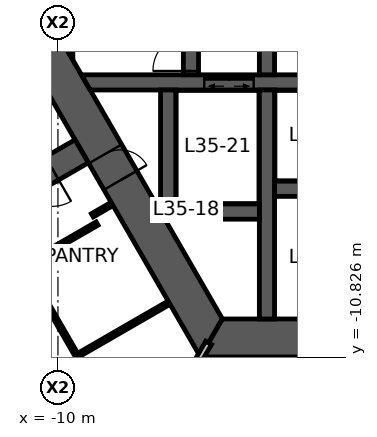
"""IFC4 building model, lengths in metres.
Left out: names, types, materials, properties, quantities, classifications, styles, units other than length and angle.
Written with IfcOpenShell. Run it as: python <this file> out.ifc"""

import sys

from ifc_helpers import new_model, si_unit, direction, frame, frame_2d, origin, place, context, subcontext, project, spatial, polyline, rectangle, outline, extrude, element, fill, save


model = new_model("IFC4")
c1 = context("Model", 3, precision=1e-05, world=origin(), true_north=direction((0.0, 1.0)))
c2 = subcontext(c1, "Body", "Model", "MODEL_VIEW")
j1 = project(units=[si_unit("LENGTHUNIT", "METRE"), si_unit("PLANEANGLEUNIT", "RADIAN")], contexts=[c1])
p1 = place(None, origin())
s1 = spatial("IfcSite", under=j1, at=p1, CompositionType="ELEMENT")
p2 = place(p1, origin())
s2 = spatial("IfcBuilding", under=s1, at=p2, CompositionType="ELEMENT")
p3 = place(p2, frame((0.0, 0.0, 140.9)))
s3 = spatial("IfcBuildingStorey", under=s2, at=p3, CompositionType="ELEMENT", Elevation=140.9)
p4 = place(p3, frame((-11.922, 0.0, 0.0), z_axis=(0.0, 0.0, 1.0), x_axis=(0.500004296715, -0.866022923061, 0.0)))
e1 = element("IfcWall", 1, at=p4, inside=s3, PredefinedType="SHEAR", context=c2, shape_type="SweptSolid", body=[
    extrude(outline(polyline([(-0.289, -0.5), (6.331, -0.5), (7.131, -0.5), (12.211, -0.5), (11.634, 0.5), (7.131, 0.5), (6.331, 0.5), (0.289, 0.5), (-0.289, -0.5)])), origin(), (0.0, 0.0, 1.0), 3.9),
])
p5 = place(p4, frame((6.331, 0.0, 0.0)))
e2 = element("IfcOpeningElement", 2, at=p5, cuts=e1, PredefinedType="OPENING", context=c2, shape_type="SweptSolid", body=[
    extrude(rectangle(XDim=0.8, YDim=2.1, at=frame_2d((0.4, 1.05))), frame((0.0, 0.51, 0.0), z_axis=(0.0, -1.0, 0.0), x_axis=(1.0, 0.0, 0.0)), (0.0, 0.0, 1.0), 1.02),
])
p6 = place(p3, frame((-5.961, -10.325, 0.0), z_axis=(0.0, 0.0, 1.0), x_axis=(1.0, 0.0, 0.0)))
e3 = element("IfcWall", 3, at=p6, inside=s3, PredefinedType="SHEAR", context=c2, shape_type="SweptSolid", body=[
    extrude(outline(polyline([(-0.289, -0.5), (5.461, -0.5), (6.461, -0.5), (12.211, -0.5), (11.634, 0.5), (6.461, 0.5), (5.461, 0.5), (0.289, 0.5), (-0.289, -0.5)])), origin(), (0.0, 0.0, 1.0), 3.9),
])
p7 = place(p6, frame((5.461, 0.0, 0.0)))
e4 = element("IfcOpeningElement", 4, at=p7, cuts=e3, PredefinedType="OPENING", context=c2, shape_type="SweptSolid", body=[
    extrude(rectangle(XDim=1.0, YDim=2.1, at=frame_2d((0.5, 1.05))), frame((0.0, 0.51, 0.0), z_axis=(0.0, -1.0, 0.0), x_axis=(1.0, 0.0, 0.0)), (0.0, 0.0, 1.0), 1.02),
])
p8 = place(p3, frame((-9.375, -5.413, 0.0), z_axis=(0.0, 0.0, 1.0), x_axis=(-0.866032377459, -0.499987921047, 0.0)))
e5 = element("IfcWall", 5, at=p8, inside=s3, PredefinedType="SHEAR", context=c2, shape_type="SweptSolid", body=[
    extrude(rectangle(XDim=7.696, YDim=0.7, at=frame_2d((3.848, 0.0))), origin(), (0.0, 0.0, 1.0), 3.9),
])
p9 = place(p8, frame((0.9, 0.0, 0.0)))
e6 = element("IfcOpeningElement", 6, at=p9, cuts=e5, PredefinedType="OPENING", context=c2, shape_type="SweptSolid", body=[
    extrude(rectangle(XDim=1.0, YDim=2.1, at=frame_2d((0.5, 1.05))), frame((0.0, 0.36, 0.0), z_axis=(0.0, -1.0, 0.0), x_axis=(1.0, 0.0, 0.0)), (0.0, 0.0, 1.0), 0.72),
])
p10 = place(p3, frame((-9.266, -3.6, 0.0), z_axis=(0.0, 0.0, 1.0), x_axis=(1.0, 0.0, 0.0)))
e7 = element("IfcWall", 7, at=p10, inside=s3, PredefinedType="SHEAR", context=c2, shape_type="SweptSolid", body=[
    extrude(outline(polyline([(0.115, -0.2), (3.116, -0.2), (4.417, -0.2), (5.667, -0.2), (6.767, -0.2), (7.866, -0.2), (7.866, 0.2), (6.767, 0.2), (5.667, 0.2), (4.417, 0.2), (3.116, 0.2), (-0.115, 0.2), (0.115, -0.2)])), origin(), (0.0, 0.0, 1.0), 3.9),
])
p11 = place(p10, frame((5.667, 0.0, 0.0)))
e8 = element("IfcOpeningElement", 8, at=p11, cuts=e7, PredefinedType="OPENING", context=c2, shape_type="SweptSolid", body=[
    extrude(rectangle(XDim=1.1, YDim=2.1, at=frame_2d((0.55, 1.05))), frame((0.0, 0.21, 0.0), z_axis=(0.0, -1.0, 0.0), x_axis=(1.0, 0.0, 0.0)), (0.0, 0.0, 1.0), 0.42),
])
p12 = place(p10, frame((3.116, 0.0, 0.0)))
e9 = element("IfcOpeningElement", 9, at=p12, cuts=e7, PredefinedType="OPENING", context=c2, shape_type="SweptSolid", body=[
    extrude(rectangle(XDim=1.3, YDim=2.1, at=frame_2d((0.65, 1.05))), frame((0.0, 0.21, 0.0), z_axis=(0.0, -1.0, 0.0), x_axis=(1.0, 0.0, 0.0)), (0.0, 0.0, 1.0), 0.42),
])
p13 = place(p3, frame((-4.5, -3.4, 0.0), z_axis=(0.0, 0.0, 1.0), x_axis=(0.0, 1.0, 0.0)))
e10 = element("IfcWall", 10, at=p13, inside=s3, PredefinedType="SHEAR", context=c2, shape_type="SweptSolid", body=[
    extrude(rectangle(XDim=6.8, YDim=0.4, at=frame_2d((3.4, 0.0))), origin(), (0.0, 0.0, 1.0), 3.9),
])
p14 = place(p13, frame((2.9, 0.0, 0.0)))
e11 = element("IfcOpeningElement", 11, at=p14, cuts=e10, PredefinedType="OPENING", context=c2, shape_type="SweptSolid", body=[
    extrude(rectangle(XDim=1.0, YDim=2.1, at=frame_2d((0.5, 1.05))), frame((0.0, 0.21, 0.0), z_axis=(0.0, -1.0, 0.0), x_axis=(1.0, 0.0, 0.0)), (0.0, 0.0, 1.0), 0.42),
])
p15 = place(p3, frame((-6.5, -3.4, 0.0), z_axis=(0.0, 0.0, 1.0), x_axis=(0.0, 1.0, 0.0)))
e12 = element("IfcWall", 12, at=p15, inside=s3, PredefinedType="SHEAR", context=c2, shape_type="SweptSolid", body=[
    extrude(rectangle(XDim=6.8, YDim=0.4, at=frame_2d((3.4, 0.0))), origin(), (0.0, 0.0, 1.0), 3.9),
])
p16 = place(p15, frame((0.1, 0.0, 0.0)))
e13 = element("IfcOpeningElement", 13, at=p16, cuts=e12, PredefinedType="OPENING", context=c2, shape_type="SweptSolid", body=[
    extrude(rectangle(XDim=1.0, YDim=2.1, at=frame_2d((0.5, 1.05))), frame((0.0, 0.21, 0.0), z_axis=(0.0, -1.0, 0.0), x_axis=(1.0, 0.0, 0.0)), (0.0, 0.0, 1.0), 0.42),
])
p17 = place(p3, frame((-4.5, -3.8, 0.0), z_axis=(0.0, 0.0, 1.0), x_axis=(0.0, -1.0, 0.0)))
e14 = element("IfcWall", 14, at=p17, inside=s3, PredefinedType="SHEAR", context=c2, shape_type="SweptSolid", body=[
    extrude(rectangle(XDim=6.025, YDim=0.4, at=frame_2d((3.012, 0.0))), origin(), (0.0, 0.0, 1.0), 3.9),
])
p18 = place(p3, frame((-4.3, -6.4, 0.0), z_axis=(0.0, 0.0, 1.0), x_axis=(1.0, 0.0, 0.0)))
e15 = element("IfcWall", 15, at=p18, inside=s3, PredefinedType="SHEAR", context=c2, shape_type="SweptSolid", body=[
    extrude(rectangle(XDim=2.5, YDim=0.4, at=frame_2d((1.25, 0.0))), origin(), (0.0, 0.0, 1.0), 3.9),
])
p19 = place(p3, frame((-6.9, -7.0, 0.0), z_axis=(0.0, 0.0, 1.0), x_axis=(1.0, 0.0, 0.0)))
e16 = element("IfcWall", 16, at=p19, inside=s3, PredefinedType="SHEAR", context=c2, shape_type="SweptSolid", body=[
    extrude(rectangle(XDim=2.2, YDim=0.4, at=frame_2d((1.1, 0.0))), origin(), (0.0, 0.0, 1.0), 3.9),
])
p20 = place(p3, frame((-7.1, -3.8, 0.0), z_axis=(0.0, 0.0, 1.0), x_axis=(0.0, -1.0, 0.0)))
e17 = element("IfcWall", 17, at=p20, inside=s3, PredefinedType="SHEAR", context=c2, shape_type="SweptSolid", body=[
    extrude(outline(polyline([(0.0, -0.2), (3.206, -0.2), (3.4, 0.0), (3.4, 0.2), (0.0, 0.2), (0.0, -0.2)])), origin(), (0.0, 0.0, 1.0), 3.9),
])
p21 = place(p3, frame((-9.808, -2.662, 0.0), z_axis=(0.0, 0.0, 1.0), x_axis=(0.0, 1.0, 0.0)))
e18 = element("IfcWall", 18, at=p21, inside=s3, PredefinedType="SHEAR", context=c2, shape_type="SweptSolid", body=[
    extrude(outline(polyline([(-0.346, -0.2), (5.671, -0.2), (4.978, 0.2), (0.346, 0.2), (-0.346, -0.2)])), origin(), (0.0, 0.0, 1.0), 3.9),
])
p22 = place(p3, frame((-6.035, -10.453, 0.0), z_axis=(0.0, 0.0, 1.0), x_axis=(-0.499989830942, -0.866031274813, 0.0)))
e19 = element("IfcWall", 19, at=p22, inside=s3, PredefinedType="PARTITIONING", context=c2, shape_type="SweptSolid", body=[
    extrude(rectangle(XDim=7.93, YDim=0.175, at=frame_2d((3.965, 0.0))), origin(), (0.0, 0.0, 1.0), 3.05),
])
p23 = place(p22, frame((1.13, 0.0, 0.0)))
e20 = element("IfcOpeningElement", 20, at=p23, cuts=e19, PredefinedType="OPENING", context=c2, shape_type="SweptSolid", body=[
    extrude(rectangle(XDim=1.0, YDim=2.1, at=frame_2d((0.5, 1.05))), frame((0.0, 0.098, 0.0), z_axis=(0.0, -1.0, 0.0), x_axis=(1.0, 0.0, 0.0)), (0.0, 0.0, 1.0), 0.195),
])
p24 = place(p3, frame((-10.355, -8.115, 0.0), z_axis=(0.0, 0.0, 1.0), x_axis=(0.866094119867, 0.499880961361, 0.0)))
e21 = element("IfcWall", 21, at=p24, inside=s3, PredefinedType="PARTITIONING", context=c2, shape_type="SweptSolid", body=[
    extrude(rectangle(XDim=1.6, YDim=0.1, at=frame_2d((0.8, 0.0))), origin(), (0.0, 0.0, 1.0), 2.95),
])
p25 = place(p3, frame((-9.5, -10.796, 0.0), z_axis=(0.0, 0.0, 1.0), x_axis=(-0.499990139034, 0.866031096941, 0.0)))
e22 = element("IfcWall", 22, at=p25, inside=s3, PredefinedType="PARTITIONING", context=c2, shape_type="SweptSolid", body=[
    extrude(rectangle(XDim=3.0, YDim=0.1, at=frame_2d((1.5, 0.0))), origin(), (0.0, 0.0, 1.0), 2.95),
])
p26 = place(p25, frame((1.8, 0.0, 0.0)))
e23 = element("IfcOpeningElement", 23, at=p26, cuts=e22, PredefinedType="OPENING", context=c2, shape_type="SweptSolid", body=[
    extrude(rectangle(XDim=0.9, YDim=2.1, at=frame_2d((0.45, 1.05))), frame((0.0, 0.06, 0.0), z_axis=(0.0, -1.0, 0.0), x_axis=(1.0, 0.0, 0.0)), (0.0, 0.0, 1.0), 0.12),
])
p27 = place(p3, frame((-9.094, -7.098, 0.0), z_axis=(0.0, 0.0, 1.0), x_axis=(0.865954211699, 0.50012328804, 0.0)))
e24 = element("IfcWall", 24, at=p27, inside=s3, PredefinedType="PARTITIONING", context=c2, shape_type="SweptSolid", body=[
    extrude(rectangle(XDim=0.58, YDim=0.1, at=frame_2d((0.29, 0.0))), origin(), (0.0, 0.0, 1.0), 2.95),
])
p28 = place(p3, frame((-7.092, -9.406, 0.0), z_axis=(0.0, 0.0, 1.0), x_axis=(-0.86603494908, -0.499983466698, 0.0)))
e25 = element("IfcWall", 25, at=p28, inside=s3, PredefinedType="PARTITIONING", context=c2, shape_type="SweptSolid", body=[
    extrude(rectangle(XDim=2.78, YDim=0.1, at=frame_2d((1.39, 0.0))), origin(), (0.0, 0.0, 1.0), 2.95),
])
p29 = place(p5, origin())
e26 = element("IfcDoor", 26, at=p29, inside=s3, OperationType="SINGLE_SWING_RIGHT", PredefinedType="DOOR", context=c2, shape_type="SweptSolid", body=[
    extrude(rectangle(XDim=0.8, YDim=2.1, at=frame_2d((0.4, 1.05))), frame((0.0, 0.025, 0.0), z_axis=(0.0, -1.0, 0.0), x_axis=(1.0, 0.0, 0.0)), (0.0, 0.0, 1.0), 0.05),
])
fill(e2, e26)
p30 = place(p16, origin())
e27 = element("IfcDoor", 27, at=p30, inside=s3, OperationType="SINGLE_SWING_LEFT", PredefinedType="DOOR", context=c2, shape_type="SweptSolid", body=[
    extrude(rectangle(XDim=1.0, YDim=2.1, at=frame_2d((0.5, 1.05))), frame((0.0, 0.025, 0.0), z_axis=(0.0, -1.0, 0.0), x_axis=(1.0, 0.0, 0.0)), (0.0, 0.0, 1.0), 0.05),
])
fill(e13, e27)
p31 = place(p9, origin())
e28 = element("IfcDoor", 28, at=p31, inside=s3, OperationType="SINGLE_SWING_LEFT", PredefinedType="DOOR", context=c2, shape_type="SweptSolid", body=[
    extrude(rectangle(XDim=1.0, YDim=2.1, at=frame_2d((0.5, 1.05))), frame((0.0, 0.025, 0.0), z_axis=(0.0, -1.0, 0.0), x_axis=(1.0, 0.0, 0.0)), (0.0, 0.0, 1.0), 0.05),
])
fill(e6, e28)
p32 = place(p12, origin())
e29 = element("IfcDoor", 29, at=p32, inside=s3, OperationType="DOUBLE_DOOR_SLIDING", PredefinedType="DOOR", context=c2, shape_type="SweptSolid", body=[
    extrude(rectangle(XDim=1.3, YDim=2.1, at=frame_2d((0.65, 1.05))), frame((0.0, 0.025, 0.0), z_axis=(0.0, -1.0, 0.0), x_axis=(1.0, 0.0, 0.0)), (0.0, 0.0, 1.0), 0.05),
])
fill(e9, e29)
save(model, sys.argv[1])
